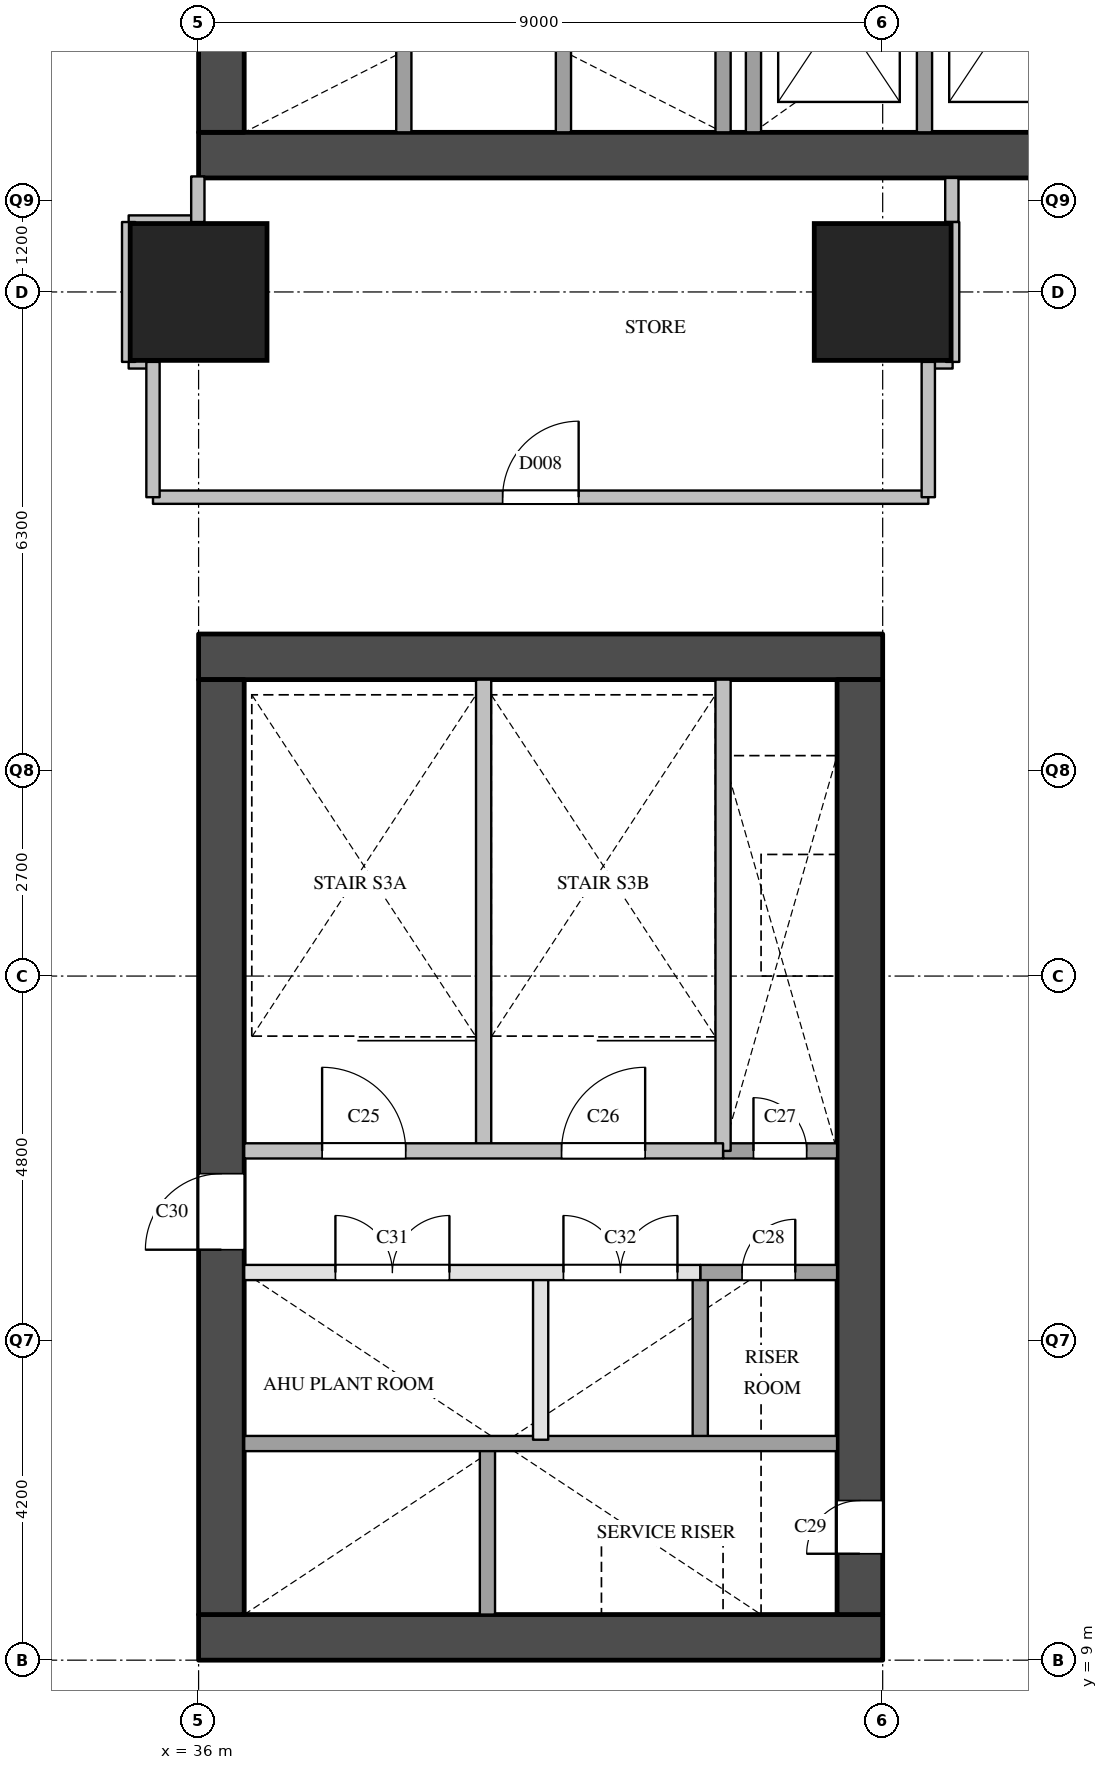
"""IFC4 building model, lengths in metres.
Left out: names, types, materials, properties, quantities, classifications, styles, units other than length and angle.
Written with IfcOpenShell. Run it as: python <this file> out.ifc"""

import sys

from ifc_helpers import new_model, si_unit, direction, frame, frame_2d, origin, origin_2d, place, context, subcontext, project, spatial, rectangle, extrude, element, fill, save


model = new_model("IFC4")
c1 = context("Model", 3, precision=1e-05, world=origin(), true_north=direction((0.0, 1.0)))
c2 = subcontext(c1, "Body", "Model", "MODEL_VIEW")
j1 = project(units=[si_unit("LENGTHUNIT", "METRE"), si_unit("PLANEANGLEUNIT", "RADIAN")], contexts=[c1])
p1 = place(None, origin())
s1 = spatial("IfcSite", under=j1, at=p1, CompositionType="ELEMENT")
p2 = place(p1, origin())
s2 = spatial("IfcBuilding", under=s1, at=p2, CompositionType="ELEMENT")
p3 = place(p2, frame((0.0, 0.0, 123.4)))
s3 = spatial("IfcBuildingStorey", under=s2, at=p3, CompositionType="ELEMENT", Elevation=123.4)
for number, where, z_axis, x_axis in (
    (1, (36.0, 27.0, 0.0), (0.0, 0.0, 1.0), (1.0, 0.0, 0.0)),
    (2, (45.0, 27.0, 0.0), (0.0, 0.0, 1.0), (1.0, 0.0, 0.0)),
):
    element("IfcColumn", number, at=place(p3, frame(where, z_axis=z_axis, x_axis=x_axis)), inside=s3, PredefinedType="COLUMN", context=c2, shape_type="SweptSolid", body=[
        extrude(rectangle(XDim=1.8, YDim=1.8, at=origin_2d()), origin(), (0.0, 0.0, 1.0), 6.0),
    ])
p4 = place(p3, frame((36.0, 28.8, 0.0), z_axis=(0.0, 0.0, 1.0), x_axis=(1.0, 0.0, 0.0)))
e3 = element("IfcWall", 3, at=p4, inside=s3, PredefinedType="SHEAR", context=c2, shape_type="SweptSolid", body=[
    extrude(rectangle(XDim=12.4, YDim=0.6, at=frame_2d((6.2, 0.0))), origin(), (0.0, 0.0, 1.0), 5.7),
])
p5 = place(p3, frame((36.3, 29.1, 0.0), z_axis=(0.0, 0.0, 1.0), x_axis=(0.0, 1.0, 0.0)))
e4 = element("IfcWall", 4, at=p5, inside=s3, PredefinedType="SHEAR", context=c2, shape_type="SweptSolid", body=[
    extrude(rectangle(XDim=20.3, YDim=0.6, at=frame_2d((10.15, 0.0))), origin(), (0.0, 0.0, 1.0), 5.7),
])
p6 = place(p5, frame((3.6, 0.0, 0.0)))
e5 = element("IfcOpeningElement", 5, at=p6, cuts=e4, PredefinedType="OPENING", context=c2, shape_type="SweptSolid", body=[
    extrude(rectangle(XDim=1.8, YDim=2.1, at=frame_2d((0.9, 1.05))), frame((0.0, 0.31, 0.0), z_axis=(0.0, -1.0, 0.0), x_axis=(1.0, 0.0, 0.0)), (0.0, 0.0, 1.0), 0.62),
])
p7 = place(p5, frame((16.4, 0.0, 0.0)))
e6 = element("IfcOpeningElement", 6, at=p7, cuts=e4, PredefinedType="OPENING", context=c2, shape_type="SweptSolid", body=[
    extrude(rectangle(XDim=1.0, YDim=2.1, at=frame_2d((0.5, 1.05))), frame((0.0, 0.31, 0.0), z_axis=(0.0, -1.0, 0.0), x_axis=(1.0, 0.0, 0.0)), (0.0, 0.0, 1.0), 0.62),
])
for number, where, z_axis, x_axis in (
    (7, (38.7, 29.1, 0.0), (0.0, 0.0, 1.0), (0.0, 1.0, 0.0)),
    (8, (40.8, 29.1, 0.0), (0.0, 0.0, 1.0), (0.0, 1.0, 0.0)),
    (9, (42.9, 29.1, 0.0), (0.0, 0.0, 1.0), (0.0, 1.0, 0.0)),
):
    element("IfcWall", number, at=place(p3, frame(where, z_axis=z_axis, x_axis=x_axis)), inside=s3, PredefinedType="SOLIDWALL", context=c2, shape_type="SweptSolid", body=[
        extrude(rectangle(XDim=3.2, YDim=0.2, at=frame_2d((1.6, 0.0))), origin(), (0.0, 0.0, 1.0), 5.7),
    ])
p8 = place(p3, frame((43.3, 29.1, 0.0), z_axis=(0.0, 0.0, 1.0), x_axis=(0.0, 1.0, 0.0)))
e10 = element("IfcWall", 10, at=p8, inside=s3, PredefinedType="SOLIDWALL", context=c2, shape_type="SweptSolid", body=[
    extrude(rectangle(XDim=9.9, YDim=0.2, at=frame_2d((4.95, 0.0))), origin(), (0.0, 0.0, 1.0), 5.7),
])
p9 = place(p8, frame((3.6, 0.0, 0.0)))
e11 = element("IfcOpeningElement", 11, at=p9, cuts=e10, PredefinedType="OPENING", context=c2, shape_type="SweptSolid", body=[
    extrude(rectangle(XDim=1.8, YDim=2.1, at=frame_2d((0.9, 1.05))), frame((0.0, 0.11, 0.0), z_axis=(0.0, -1.0, 0.0), x_axis=(1.0, 0.0, 0.0)), (0.0, 0.0, 1.0), 0.22),
])
p10 = place(p3, frame((45.55, 29.1, 0.0), z_axis=(0.0, 0.0, 1.0), x_axis=(0.0, 1.0, 0.0)))
e12 = element("IfcWall", 12, at=p10, inside=s3, PredefinedType="SOLIDWALL", context=c2, shape_type="SweptSolid", body=[
    extrude(rectangle(XDim=3.2, YDim=0.2, at=frame_2d((1.6, 0.0))), origin(), (0.0, 0.0, 1.0), 5.7),
])
for number, where, z_axis, x_axis in (
    (13, (36.0, 9.3, 0.0), (0.0, 0.0, 1.0), (1.0, 0.0, 0.0)),
    (14, (36.0, 22.2, 0.0), (0.0, 0.0, 1.0), (1.0, 0.0, 0.0)),
):
    element("IfcWall", number, at=place(p3, frame(where, z_axis=z_axis, x_axis=x_axis)), inside=s3, PredefinedType="SHEAR", context=c2, shape_type="SweptSolid", body=[
        extrude(rectangle(XDim=9.0, YDim=0.6, at=frame_2d((4.5, 0.0))), origin(), (0.0, 0.0, 1.0), 5.7),
    ])
p11 = place(p3, frame((36.3, 9.6, 0.0), z_axis=(0.0, 0.0, 1.0), x_axis=(0.0, 1.0, 0.0)))
e15 = element("IfcWall", 15, at=p11, inside=s3, PredefinedType="SHEAR", context=c2, shape_type="SweptSolid", body=[
    extrude(rectangle(XDim=12.3, YDim=0.6, at=frame_2d((6.15, 0.0))), origin(), (0.0, 0.0, 1.0), 5.7),
])
p12 = place(p11, frame((4.8, 0.0, 0.0)))
e16 = element("IfcOpeningElement", 16, at=p12, cuts=e15, PredefinedType="OPENING", context=c2, shape_type="SweptSolid", body=[
    extrude(rectangle(XDim=1.0, YDim=2.1, at=frame_2d((0.5, 1.05))), frame((0.0, 0.31, 0.0), z_axis=(0.0, -1.0, 0.0), x_axis=(1.0, 0.0, 0.0)), (0.0, 0.0, 1.0), 0.62),
])
p13 = place(p3, frame((44.7, 9.6, 0.0), z_axis=(0.0, 0.0, 1.0), x_axis=(0.0, 1.0, 0.0)))
e17 = element("IfcWall", 17, at=p13, inside=s3, PredefinedType="SHEAR", context=c2, shape_type="SweptSolid", body=[
    extrude(rectangle(XDim=12.3, YDim=0.6, at=frame_2d((6.15, 0.0))), origin(), (0.0, 0.0, 1.0), 5.7),
])
p14 = place(p13, frame((0.8, 0.0, 0.0)))
e18 = element("IfcOpeningElement", 18, at=p14, cuts=e17, PredefinedType="OPENING", context=c2, shape_type="SweptSolid", body=[
    extrude(rectangle(XDim=0.7, YDim=2.1, at=frame_2d((0.35, 1.05))), frame((0.0, 0.31, 0.0), z_axis=(0.0, -1.0, 0.0), x_axis=(1.0, 0.0, 0.0)), (0.0, 0.0, 1.0), 0.62),
])
p15 = place(p3, frame((39.75, 15.7, 0.0), z_axis=(0.0, 0.0, 1.0), x_axis=(0.0, 1.0, 0.0)))
e19 = element("IfcWall", 19, at=p15, inside=s3, PredefinedType="SOLIDWALL", context=c2, shape_type="SweptSolid", body=[
    extrude(rectangle(XDim=6.2, YDim=0.2, at=frame_2d((3.1, 0.0))), origin(), (0.0, 0.0, 1.0), 5.7),
])
p16 = place(p3, frame((39.8, 9.6, 0.0), z_axis=(0.0, 0.0, 1.0), x_axis=(0.0, 1.0, 0.0)))
e20 = element("IfcWall", 20, at=p16, inside=s3, PredefinedType="SOLIDWALL", context=c2, shape_type="SweptSolid", body=[
    extrude(rectangle(XDim=2.3, YDim=0.2, at=frame_2d((1.15, 0.0))), origin(), (0.0, 0.0, 1.0), 5.7),
])
p17 = place(p3, frame((40.5, 11.9, 0.0), z_axis=(0.0, 0.0, 1.0), x_axis=(0.0, 1.0, 0.0)))
e21 = element("IfcWall", 21, at=p17, inside=s3, PredefinedType="PARTITIONING", context=c2, shape_type="SweptSolid", body=[
    extrude(rectangle(XDim=2.2, YDim=0.2, at=frame_2d((1.1, 0.0))), origin(), (0.0, 0.0, 1.0), 5.7),
])
p18 = place(p3, frame((42.6, 11.9, 0.0), z_axis=(0.0, 0.0, 1.0), x_axis=(0.0, 1.0, 0.0)))
e22 = element("IfcWall", 22, at=p18, inside=s3, PredefinedType="SOLIDWALL", context=c2, shape_type="SweptSolid", body=[
    extrude(rectangle(XDim=2.2, YDim=0.2, at=frame_2d((1.1, 0.0))), origin(), (0.0, 0.0, 1.0), 5.7),
])
p19 = place(p3, frame((42.9, 15.7, 0.0), z_axis=(0.0, 0.0, 1.0), x_axis=(0.0, 1.0, 0.0)))
e23 = element("IfcWall", 23, at=p19, inside=s3, PredefinedType="SOLIDWALL", context=c2, shape_type="SweptSolid", body=[
    extrude(rectangle(XDim=6.2, YDim=0.2, at=frame_2d((3.1, 0.0))), origin(), (0.0, 0.0, 1.0), 5.7),
])
p20 = place(p3, frame((36.6, 11.85, 0.0), z_axis=(0.0, 0.0, 1.0), x_axis=(1.0, 0.0, 0.0)))
e24 = element("IfcWall", 24, at=p20, inside=s3, PredefinedType="SOLIDWALL", context=c2, shape_type="SweptSolid", body=[
    extrude(rectangle(XDim=7.8, YDim=0.2, at=frame_2d((3.9, 0.0))), origin(), (0.0, 0.0, 1.0), 5.7),
])
p21 = place(p3, frame((36.6, 14.1, 0.0), z_axis=(0.0, 0.0, 1.0), x_axis=(1.0, 0.0, 0.0)))
e25 = element("IfcWall", 25, at=p21, inside=s3, PredefinedType="PARTITIONING", context=c2, shape_type="SweptSolid", body=[
    extrude(rectangle(XDim=6.0, YDim=0.2, at=frame_2d((3.0, 0.0))), origin(), (0.0, 0.0, 1.0), 5.7),
])
p22 = place(p21, frame((1.2, 0.0, 0.0)))
e26 = element("IfcOpeningElement", 26, at=p22, cuts=e25, PredefinedType="OPENING", context=c2, shape_type="SweptSolid", body=[
    extrude(rectangle(XDim=1.5, YDim=2.1, at=frame_2d((0.75, 1.05))), frame((0.0, 0.11, 0.0), z_axis=(0.0, -1.0, 0.0), x_axis=(1.0, 0.0, 0.0)), (0.0, 0.0, 1.0), 0.22),
])
p23 = place(p21, frame((4.2, 0.0, 0.0)))
e27 = element("IfcOpeningElement", 27, at=p23, cuts=e25, PredefinedType="OPENING", context=c2, shape_type="SweptSolid", body=[
    extrude(rectangle(XDim=1.5, YDim=2.1, at=frame_2d((0.75, 1.05))), frame((0.0, 0.11, 0.0), z_axis=(0.0, -1.0, 0.0), x_axis=(1.0, 0.0, 0.0)), (0.0, 0.0, 1.0), 0.22),
])
p24 = place(p3, frame((42.6, 14.1, 0.0), z_axis=(0.0, 0.0, 1.0), x_axis=(1.0, 0.0, 0.0)))
e28 = element("IfcWall", 28, at=p24, inside=s3, PredefinedType="SOLIDWALL", context=c2, shape_type="SweptSolid", body=[
    extrude(rectangle(XDim=1.8, YDim=0.2, at=frame_2d((0.9, 0.0))), origin(), (0.0, 0.0, 1.0), 5.7),
])
p25 = place(p24, frame((0.55, 0.0, 0.0)))
e29 = element("IfcOpeningElement", 29, at=p25, cuts=e28, PredefinedType="OPENING", context=c2, shape_type="SweptSolid", body=[
    extrude(rectangle(XDim=0.7, YDim=2.1, at=frame_2d((0.35, 1.05))), frame((0.0, 0.11, 0.0), z_axis=(0.0, -1.0, 0.0), x_axis=(1.0, 0.0, 0.0)), (0.0, 0.0, 1.0), 0.22),
])
p26 = place(p3, frame((42.9, 15.7, 0.0), z_axis=(0.0, 0.0, 1.0), x_axis=(1.0, 0.0, 0.0)))
e30 = element("IfcWall", 30, at=p26, inside=s3, PredefinedType="SOLIDWALL", context=c2, shape_type="SweptSolid", body=[
    extrude(rectangle(XDim=1.5, YDim=0.2, at=frame_2d((0.75, 0.0))), origin(), (0.0, 0.0, 1.0), 5.7),
])
p27 = place(p26, frame((0.4, 0.0, 0.0)))
e31 = element("IfcOpeningElement", 31, at=p27, cuts=e30, PredefinedType="OPENING", context=c2, shape_type="SweptSolid", body=[
    extrude(rectangle(XDim=0.7, YDim=2.1, at=frame_2d((0.35, 1.05))), frame((0.0, 0.11, 0.0), z_axis=(0.0, -1.0, 0.0), x_axis=(1.0, 0.0, 0.0)), (0.0, 0.0, 1.0), 0.22),
])
p28 = place(p3, frame((36.6, 15.7, 0.0), z_axis=(0.0, 0.0, 1.0), x_axis=(1.0, 0.0, 0.0)))
e32 = element("IfcWall", 32, at=p28, inside=s3, PredefinedType="SOLIDWALL", context=c2, shape_type="SweptSolid", body=[
    extrude(rectangle(XDim=6.3, YDim=0.2, at=frame_2d((3.15, 0.0))), origin(), (0.0, 0.0, 1.0), 5.7),
])
p29 = place(p28, frame((1.025, 0.0, 0.0)))
e33 = element("IfcOpeningElement", 33, at=p29, cuts=e32, PredefinedType="OPENING", context=c2, shape_type="SweptSolid", body=[
    extrude(rectangle(XDim=1.1, YDim=2.1, at=frame_2d((0.55, 1.05))), frame((0.0, 0.11, 0.0), z_axis=(0.0, -1.0, 0.0), x_axis=(1.0, 0.0, 0.0)), (0.0, 0.0, 1.0), 0.22),
])
p30 = place(p28, frame((4.175, 0.0, 0.0)))
e34 = element("IfcOpeningElement", 34, at=p30, cuts=e32, PredefinedType="OPENING", context=c2, shape_type="SweptSolid", body=[
    extrude(rectangle(XDim=1.1, YDim=2.1, at=frame_2d((0.55, 1.05))), frame((0.0, 0.11, 0.0), z_axis=(0.0, -1.0, 0.0), x_axis=(1.0, 0.0, 0.0)), (0.0, 0.0, 1.0), 0.22),
])
p31 = place(p3, frame((35.4, 24.3, 0.0), z_axis=(0.0, 0.0, 1.0), x_axis=(1.0, 0.0, 0.0)))
e35 = element("IfcWall", 35, at=p31, inside=s3, PredefinedType="PARTITIONING", context=c2, shape_type="SweptSolid", body=[
    extrude(rectangle(XDim=10.2, YDim=0.175, at=frame_2d((5.1, 0.0))), origin(), (0.0, 0.0, 1.0), 5.7),
])
p32 = place(p31, frame((4.6, 0.0, 0.0)))
e36 = element("IfcOpeningElement", 36, at=p32, cuts=e35, PredefinedType="OPENING", context=c2, shape_type="SweptSolid", body=[
    extrude(rectangle(XDim=1.0, YDim=2.1, at=frame_2d((0.5, 1.05))), frame((0.0, 0.097, 0.0), z_axis=(0.0, -1.0, 0.0), x_axis=(1.0, 0.0, 0.0)), (0.0, 0.0, 1.0), 0.195),
])
for number, where, z_axis, x_axis in (
    (37, (35.08, 26.08, 0.0), (0.0, 0.0, 1.0), (1.0, 0.0, 0.0)),
    (38, (45.6, 26.08, 0.0), (0.0, 0.0, 1.0), (1.0, 0.0, 0.0)),
):
    element("IfcWall", number, at=place(p3, frame(where, z_axis=z_axis, x_axis=x_axis)), inside=s3, PredefinedType="PARTITIONING", context=c2, shape_type="SweptSolid", body=[
        extrude(rectangle(XDim=0.32, YDim=0.175, at=frame_2d((0.16, 0.0))), origin(), (0.0, 0.0, 1.0), 5.7),
    ])
p33 = place(p3, frame((35.08, 27.92, 0.0), z_axis=(0.0, 0.0, 1.0), x_axis=(1.0, 0.0, 0.0)))
e39 = element("IfcWall", 39, at=p33, inside=s3, PredefinedType="PARTITIONING", context=c2, shape_type="SweptSolid", body=[
    extrude(rectangle(XDim=0.91, YDim=0.175, at=frame_2d((0.455, 0.0))), origin(), (0.0, 0.0, 1.0), 5.7),
])
p34 = place(p3, frame((35.08, 26.08, 0.0), z_axis=(0.0, 0.0, 1.0), x_axis=(0.0, 1.0, 0.0)))
e40 = element("IfcWall", 40, at=p34, inside=s3, PredefinedType="PARTITIONING", context=c2, shape_type="SweptSolid", body=[
    extrude(rectangle(XDim=1.84, YDim=0.175, at=frame_2d((0.92, 0.0))), origin(), (0.0, 0.0, 1.0), 5.7),
])
p35 = place(p3, frame((35.4, 24.3, 0.0), z_axis=(0.0, 0.0, 1.0), x_axis=(0.0, 1.0, 0.0)))
e41 = element("IfcWall", 41, at=p35, inside=s3, PredefinedType="PARTITIONING", context=c2, shape_type="SweptSolid", body=[
    extrude(rectangle(XDim=1.78, YDim=0.175, at=frame_2d((0.89, 0.0))), origin(), (0.0, 0.0, 1.0), 5.7),
])
p36 = place(p3, frame((35.99, 27.92, 0.0), z_axis=(0.0, 0.0, 1.0), x_axis=(0.0, 1.0, 0.0)))
e42 = element("IfcWall", 42, at=p36, inside=s3, PredefinedType="PARTITIONING", context=c2, shape_type="SweptSolid", body=[
    extrude(rectangle(XDim=0.6, YDim=0.175, at=frame_2d((0.3, 0.0))), origin(), (0.0, 0.0, 1.0), 5.7),
])
p37 = place(p3, frame((45.6, 24.3, 0.0), z_axis=(0.0, 0.0, 1.0), x_axis=(0.0, 1.0, 0.0)))
e43 = element("IfcWall", 43, at=p37, inside=s3, PredefinedType="PARTITIONING", context=c2, shape_type="SweptSolid", body=[
    extrude(rectangle(XDim=1.78, YDim=0.175, at=frame_2d((0.89, 0.0))), origin(), (0.0, 0.0, 1.0), 5.7),
])
p38 = place(p3, frame((45.91, 27.92, 0.0), z_axis=(0.0, 0.0, 1.0), x_axis=(0.0, 1.0, 0.0)))
e44 = element("IfcWall", 44, at=p38, inside=s3, PredefinedType="PARTITIONING", context=c2, shape_type="SweptSolid", body=[
    extrude(rectangle(XDim=0.58, YDim=0.175, at=frame_2d((0.29, 0.0))), origin(), (0.0, 0.0, 1.0), 5.7),
])
p39 = place(p3, frame((45.92, 26.08, 0.0), z_axis=(0.0, 0.0, 1.0), x_axis=(0.0, 1.0, 0.0)))
e45 = element("IfcWall", 45, at=p39, inside=s3, PredefinedType="PARTITIONING", context=c2, shape_type="SweptSolid", body=[
    extrude(rectangle(XDim=1.84, YDim=0.175, at=frame_2d((0.92, 0.0))), origin(), (0.0, 0.0, 1.0), 5.7),
])
p40 = place(p29, origin())
e46 = element("IfcDoor", 46, at=p40, inside=s3, OperationType="SINGLE_SWING_LEFT", PredefinedType="DOOR", context=c2, shape_type="SweptSolid", body=[
    extrude(rectangle(XDim=1.1, YDim=2.1, at=frame_2d((0.55, 1.05))), frame((0.0, 0.025, 0.0), z_axis=(0.0, -1.0, 0.0), x_axis=(1.0, 0.0, 0.0)), (0.0, 0.0, 1.0), 0.05),
])
fill(e33, e46)
p41 = place(p30, origin())
e47 = element("IfcDoor", 47, at=p41, inside=s3, OperationType="SINGLE_SWING_RIGHT", PredefinedType="DOOR", context=c2, shape_type="SweptSolid", body=[
    extrude(rectangle(XDim=1.1, YDim=2.1, at=frame_2d((0.55, 1.05))), frame((0.0, 0.025, 0.0), z_axis=(0.0, -1.0, 0.0), x_axis=(1.0, 0.0, 0.0)), (0.0, 0.0, 1.0), 0.05),
])
fill(e34, e47)
p42 = place(p27, origin())
e48 = element("IfcDoor", 48, at=p42, inside=s3, OperationType="SINGLE_SWING_LEFT", PredefinedType="DOOR", context=c2, shape_type="SweptSolid", body=[
    extrude(rectangle(XDim=0.7, YDim=2.1, at=frame_2d((0.35, 1.05))), frame((0.0, 0.025, 0.0), z_axis=(0.0, -1.0, 0.0), x_axis=(1.0, 0.0, 0.0)), (0.0, 0.0, 1.0), 0.05),
])
fill(e31, e48)
p43 = place(p25, origin())
e49 = element("IfcDoor", 49, at=p43, inside=s3, OperationType="SINGLE_SWING_RIGHT", PredefinedType="DOOR", context=c2, shape_type="SweptSolid", body=[
    extrude(rectangle(XDim=0.7, YDim=2.1, at=frame_2d((0.35, 1.05))), frame((0.0, 0.025, 0.0), z_axis=(0.0, -1.0, 0.0), x_axis=(1.0, 0.0, 0.0)), (0.0, 0.0, 1.0), 0.05),
])
fill(e29, e49)
p44 = place(p14, origin())
e50 = element("IfcDoor", 50, at=p44, inside=s3, OperationType="SINGLE_SWING_LEFT", PredefinedType="DOOR", context=c2, shape_type="SweptSolid", body=[
    extrude(rectangle(XDim=0.7, YDim=2.1, at=frame_2d((0.35, 1.05))), frame((0.0, 0.025, 0.0), z_axis=(0.0, -1.0, 0.0), x_axis=(1.0, 0.0, 0.0)), (0.0, 0.0, 1.0), 0.05),
])
fill(e18, e50)
p45 = place(p12, origin())
e51 = element("IfcDoor", 51, at=p45, inside=s3, OperationType="SINGLE_SWING_LEFT", PredefinedType="DOOR", context=c2, shape_type="SweptSolid", body=[
    extrude(rectangle(XDim=1.0, YDim=2.1, at=frame_2d((0.5, 1.05))), frame((0.0, 0.025, 0.0), z_axis=(0.0, -1.0, 0.0), x_axis=(1.0, 0.0, 0.0)), (0.0, 0.0, 1.0), 0.05),
])
fill(e16, e51)
p46 = place(p22, origin())
e52 = element("IfcDoor", 52, at=p46, inside=s3, OperationType="DOUBLE_DOOR_SINGLE_SWING", PredefinedType="DOOR", context=c2, shape_type="SweptSolid", body=[
    extrude(rectangle(XDim=1.5, YDim=2.1, at=frame_2d((0.75, 1.05))), frame((0.0, 0.025, 0.0), z_axis=(0.0, -1.0, 0.0), x_axis=(1.0, 0.0, 0.0)), (0.0, 0.0, 1.0), 0.05),
])
fill(e26, e52)
p47 = place(p23, origin())
e53 = element("IfcDoor", 53, at=p47, inside=s3, OperationType="DOUBLE_DOOR_SINGLE_SWING", PredefinedType="DOOR", context=c2, shape_type="SweptSolid", body=[
    extrude(rectangle(XDim=1.5, YDim=2.1, at=frame_2d((0.75, 1.05))), frame((0.0, 0.025, 0.0), z_axis=(0.0, -1.0, 0.0), x_axis=(1.0, 0.0, 0.0)), (0.0, 0.0, 1.0), 0.05),
])
fill(e27, e53)
p48 = place(p32, origin())
e54 = element("IfcDoor", 54, at=p48, inside=s3, OperationType="SINGLE_SWING_RIGHT", PredefinedType="DOOR", context=c2, shape_type="SweptSolid", body=[
    extrude(rectangle(XDim=1.0, YDim=2.1, at=frame_2d((0.5, 1.05))), frame((0.0, 0.025, 0.0), z_axis=(0.0, -1.0, 0.0), x_axis=(1.0, 0.0, 0.0)), (0.0, 0.0, 1.0), 0.05),
])
fill(e36, e54)
save(model, sys.argv[1])
